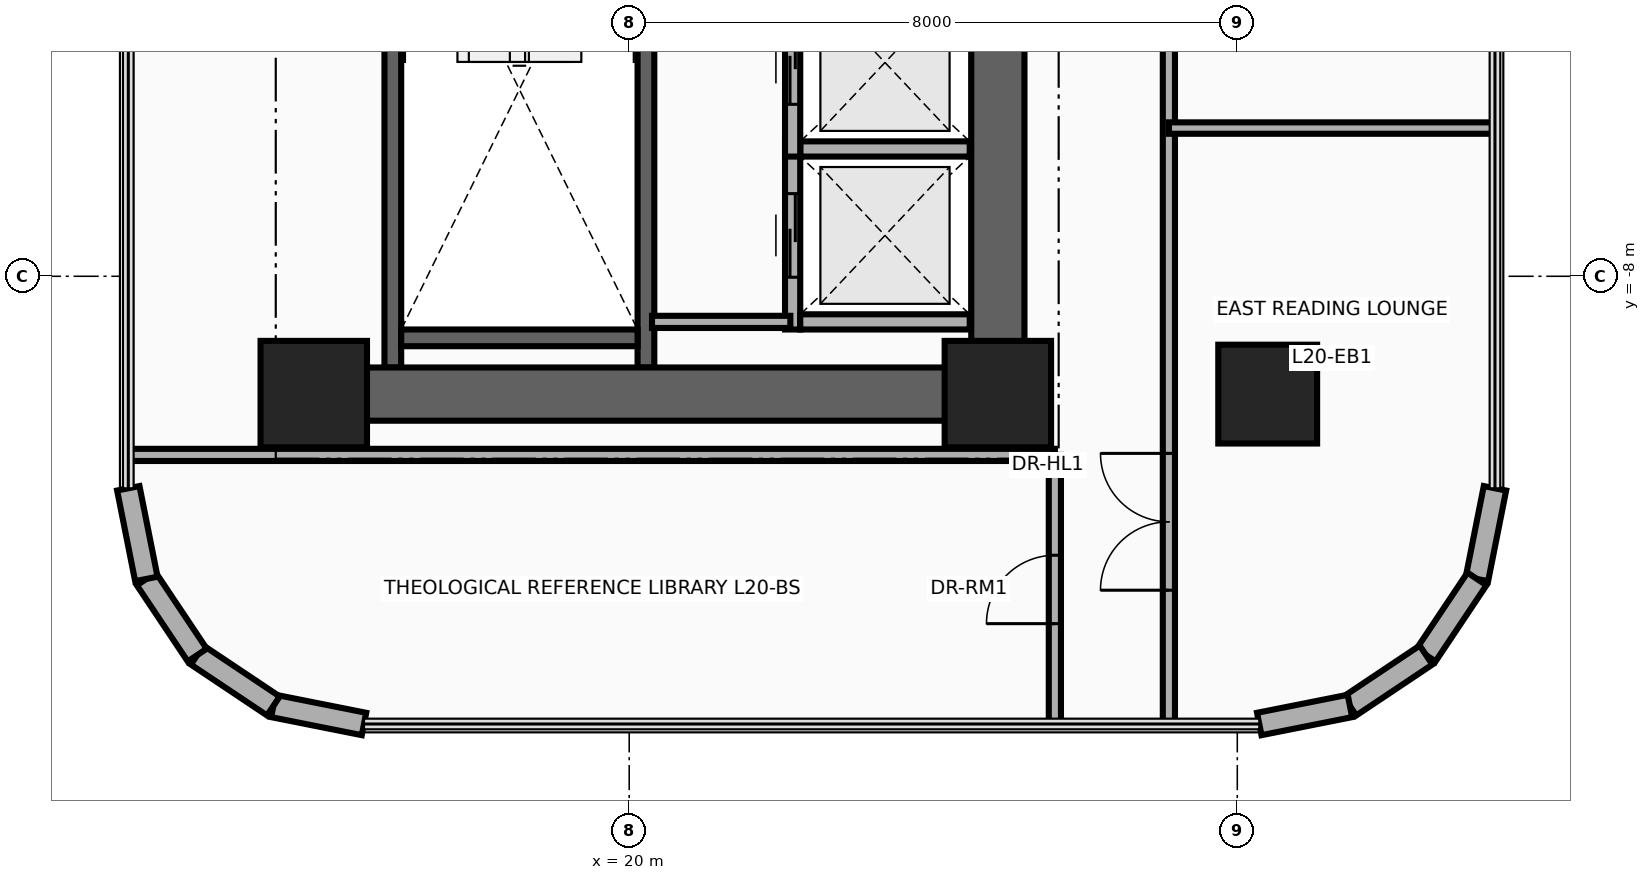
"""IFC4 building model, lengths in metres.
Left out: names, types, materials, properties, quantities, classifications, styles, units other than length and angle.
Written with IfcOpenShell. Run it as: python <this file> out.ifc"""

import sys

from ifc_helpers import new_model, si_unit, direction, frame, frame_2d, origin, origin_2d, place, context, subcontext, project, spatial, rectangle, circle, extrude, source, transform, mapped, element, fill, save


model = new_model("IFC4")
c1 = context("Model", 3, precision=1e-05, world=origin(), true_north=direction((0.0, 1.0)))
c2 = subcontext(c1, "Body", "Model", "MODEL_VIEW")
j1 = project(units=[si_unit("LENGTHUNIT", "METRE"), si_unit("PLANEANGLEUNIT", "RADIAN")], contexts=[c1])
p1 = place(None, origin())
s1 = spatial("IfcSite", under=j1, at=p1, CompositionType="ELEMENT")
p2 = place(p1, origin())
s2 = spatial("IfcBuilding", under=s1, at=p2, CompositionType="ELEMENT")
p3 = place(p2, frame((0.0, 0.0, 81.5)))
s3 = spatial("IfcBuildingStorey", under=s2, at=p3, CompositionType="ELEMENT", Elevation=81.5)
for number, where, z_axis, x_axis in (
    (1, (16.89, -9.2, 0.0), (0.0, 0.0, 1.0), (0.0, 1.0, 0.0)),
    (2, (20.22, -9.2, 0.0), (0.0, 0.0, 1.0), (0.0, 1.0, 0.0)),
):
    element("IfcWall", number, at=place(p3, frame(where, z_axis=z_axis, x_axis=x_axis)), inside=s3, PredefinedType="SHEAR", context=c2, shape_type="SweptSolid", body=[
        extrude(rectangle(XDim=8.52, YDim=0.22, at=frame_2d((4.26, 0.0))), origin(), (0.0, 0.0, 1.0), 3.46),
    ])
p4 = place(p3, frame((17.0, -8.81, 0.0), z_axis=(0.0, 0.0, 1.0), x_axis=(1.0, 0.0, 0.0)))
e3 = element("IfcWall", 3, at=p4, inside=s3, PredefinedType="SHEAR", context=c2, shape_type="SweptSolid", body=[
    extrude(rectangle(XDim=3.11, YDim=0.22, at=frame_2d((1.555, 0.0))), origin(), (0.0, 0.0, 1.0), 3.46),
])
p5 = place(p3, frame((24.85, -9.9, 0.0), z_axis=(0.0, 0.0, 1.0), x_axis=(0.0, 1.0, 0.0)))
e4 = element("IfcWall", 4, at=p5, inside=s3, PredefinedType="SHEAR", context=c2, shape_type="SweptSolid", body=[
    extrude(rectangle(XDim=8.95, YDim=0.7, at=frame_2d((4.475, 0.0))), origin(), (0.0, 0.0, 1.0), 3.46),
])
p6 = place(p3, frame((15.85, -9.55, 0.0), z_axis=(0.0, 0.0, 1.0), x_axis=(1.0, 0.0, 0.0)))
e5 = element("IfcWall", 5, at=p6, inside=s3, PredefinedType="SHEAR", context=c2, shape_type="SweptSolid", body=[
    extrude(rectangle(XDim=9.0, YDim=0.7, at=frame_2d((4.5, 0.0))), origin(), (0.0, 0.0, 1.0), 3.46),
])
m1 = source(origin(), c2, "Body", "SweptSolid", [
    extrude(rectangle(XDim=1.4, YDim=1.4, at=origin_2d()), origin(), (0.0, 0.0, 1.0), 3.7),
])
for number, where, z_axis, x_axis in (
    (6, (15.85, -9.55, 0.0), (0.0, 0.0, 1.0), (1.0, 0.0, 0.0)),
    (7, (24.85, -9.55, 0.0), (0.0, 0.0, 1.0), (1.0, 0.0, 0.0)),
):
    element("IfcColumn", number, at=place(p3, frame(where, z_axis=z_axis, x_axis=x_axis)), inside=s3, PredefinedType="COLUMN", context=c2, shape_type="MappedRepresentation", body=[
        mapped(m1, transform((0.0, 0.0, 0.0), x_axis=(1.0, 0.0, 0.0), y_axis=(0.0, 1.0, 0.0), z_axis=(0.0, 0.0, 1.0), scale=1.0)),
    ])
m2 = source(origin(), c2, "Body", "SweptSolid", [
    extrude(circle(Radius=0.65, at=origin_2d()), origin(), (0.0, 0.0, 1.0), 3.7),
])
p7 = place(p3, frame((28.4, -9.55, 0.0), z_axis=(0.0, 0.0, 1.0), x_axis=(1.0, 0.0, 0.0)))
e8 = element("IfcColumn", 8, at=p7, inside=s3, PredefinedType="COLUMN", context=c2, shape_type="MappedRepresentation", body=[
    mapped(m2, transform((0.0, 0.0, 0.0), x_axis=(1.0, 0.0, 0.0), y_axis=(0.0, 1.0, 0.0), z_axis=(0.0, 0.0, 1.0), scale=1.0)),
])
p8 = place(p3, frame((31.39, -10.789, 0.0), z_axis=(0.0, 0.0, 1.0), x_axis=(-0.194996050505, -0.980804027463, 0.0)))
e9 = element("IfcWall", 9, at=p8, inside=s3, PredefinedType="SOLIDWALL", context=c2, shape_type="SweptSolid", body=[
    extrude(rectangle(XDim=1.216, YDim=0.3, at=frame_2d((0.608, 0.0))), origin(), (0.0, 0.0, 1.0), 3.46),
])
for number, where, z_axis, x_axis in (
    (10, (31.153, -11.982, 0.0), (0.0, 0.0, 1.0), (-0.556, -0.831, 0.0)),
    (11, (30.483, -12.983, 0.0), (0.0, 0.0, 1.0), (-0.831, -0.556, 0.0)),
):
    element("IfcWall", number, at=place(p3, frame(where, z_axis=z_axis, x_axis=x_axis)), inside=s3, PredefinedType="SOLIDWALL", context=c2, shape_type="SweptSolid", body=[
        extrude(rectangle(XDim=1.205, YDim=0.3, at=frame_2d((0.603, 0.0))), origin(), (0.0, 0.0, 1.0), 3.46),
    ])
for number, where, z_axis, x_axis in (
    (12, (29.482, -13.653, 0.0), (0.0, 0.0, 1.0), (-0.981, -0.195, 0.0)),
    (13, (16.511, -13.89, 0.0), (0.0, 0.0, 1.0), (-0.981, 0.195, 0.0)),
):
    element("IfcWall", number, at=place(p3, frame(where, z_axis=z_axis, x_axis=x_axis)), inside=s3, PredefinedType="SOLIDWALL", context=c2, shape_type="SweptSolid", body=[
        extrude(rectangle(XDim=1.216, YDim=0.3, at=frame_2d((0.608, 0.0))), origin(), (0.0, 0.0, 1.0), 3.46),
    ])
for number, where, z_axis, x_axis in (
    (14, (15.318, -13.653, 0.0), (0.0, 0.0, 1.0), (-0.831, 0.556, 0.0)),
    (15, (14.317, -12.983, 0.0), (0.0, 0.0, 1.0), (-0.556, 0.831, 0.0)),
):
    element("IfcWall", number, at=place(p3, frame(where, z_axis=z_axis, x_axis=x_axis)), inside=s3, PredefinedType="SOLIDWALL", context=c2, shape_type="SweptSolid", body=[
        extrude(rectangle(XDim=1.205, YDim=0.3, at=frame_2d((0.603, 0.0))), origin(), (0.0, 0.0, 1.0), 3.46),
    ])
p9 = place(p3, frame((13.647, -11.982, 0.0), z_axis=(0.0, 0.0, 1.0), x_axis=(-0.195189223115, 0.980765602568, 0.0)))
e16 = element("IfcWall", 16, at=p9, inside=s3, PredefinedType="SOLIDWALL", context=c2, shape_type="SweptSolid", body=[
    extrude(rectangle(XDim=1.216, YDim=0.3, at=frame_2d((0.608, 0.0))), origin(), (0.0, 0.0, 1.0), 3.46),
])
p10 = place(p3, frame((22.15, -8.7, 0.0), z_axis=(0.0, 0.0, 1.0), x_axis=(0.0, 1.0, 0.0)))
e17 = element("IfcWall", 17, at=p10, inside=s3, PredefinedType="MOVABLE", context=c2, shape_type="SweptSolid", body=[
    extrude(rectangle(XDim=2.475, YDim=0.2, at=frame_2d((1.237, 0.0))), origin(), (0.0, 0.0, 1.0), 3.46),
])
p11 = place(p10, frame((0.688, 0.0, 0.0)))
e18 = element("IfcOpeningElement", 18, at=p11, cuts=e17, PredefinedType="OPENING", context=c2, shape_type="SweptSolid", body=[
    extrude(rectangle(XDim=1.1, YDim=2.1, at=frame_2d((0.55, 1.05))), frame((0.0, 0.115, 0.0), z_axis=(0.0, -1.0, 0.0), x_axis=(1.0, 0.0, 0.0)), (0.0, 0.0, 1.0), 0.23),
])
for number, where, z_axis, x_axis in (
    (19, (22.25, -8.6, 0.0), (0.0, 0.0, 1.0), (1.0, 0.0, 0.0)),
    (20, (22.25, -6.325, 0.0), (0.0, 0.0, 1.0), (1.0, 0.0, 0.0)),
):
    element("IfcWall", number, at=place(p3, frame(where, z_axis=z_axis, x_axis=x_axis)), inside=s3, PredefinedType="MOVABLE", context=c2, shape_type="SweptSolid", body=[
        extrude(rectangle(XDim=2.23, YDim=0.2, at=frame_2d((1.115, 0.0))), origin(), (0.0, 0.0, 1.0), 3.46),
    ])
p12 = place(p3, frame((22.15, -6.425, 0.0), z_axis=(0.0, 0.0, 1.0), x_axis=(0.0, 1.0, 0.0)))
e21 = element("IfcWall", 21, at=p12, inside=s3, PredefinedType="MOVABLE", context=c2, shape_type="SweptSolid", body=[
    extrude(rectangle(XDim=2.475, YDim=0.2, at=frame_2d((1.238, 0.0))), origin(), (0.0, 0.0, 1.0), 3.46),
])
p13 = place(p12, frame((0.688, 0.0, 0.0)))
e22 = element("IfcOpeningElement", 22, at=p13, cuts=e21, PredefinedType="OPENING", context=c2, shape_type="SweptSolid", body=[
    extrude(rectangle(XDim=1.1, YDim=2.1, at=frame_2d((0.55, 1.05))), frame((0.0, 0.115, 0.0), z_axis=(0.0, -1.0, 0.0), x_axis=(1.0, 0.0, 0.0)), (0.0, 0.0, 1.0), 0.23),
])
p14 = place(p3, frame((20.3, -8.6, 0.0), z_axis=(0.0, 0.0, 1.0), x_axis=(1.0, 0.0, 0.0)))
e23 = element("IfcWall", 23, at=p14, inside=s3, PredefinedType="PARTITIONING", context=c2, shape_type="SweptSolid", body=[
    extrude(rectangle(XDim=1.82, YDim=0.16, at=frame_2d((0.91, 0.0))), origin(), (0.0, 0.0, 1.0), 3.46),
])
p15 = place(p3, frame((25.6, -13.89, 0.0), z_axis=(0.0, 0.0, 1.0), x_axis=(0.0, 1.0, 0.0)))
e24 = element("IfcWall", 24, at=p15, inside=s3, PredefinedType="PARTITIONING", context=c2, shape_type="SweptSolid", body=[
    extrude(rectangle(XDim=3.54, YDim=0.16, at=frame_2d((1.77, 0.0))), origin(), (0.0, 0.0, 1.0), 3.46),
])
p16 = place(p15, frame((1.32, 0.0, 0.0)))
e25 = element("IfcOpeningElement", 25, at=p16, cuts=e24, PredefinedType="OPENING", context=c2, shape_type="SweptSolid", body=[
    extrude(rectangle(XDim=0.9, YDim=2.1, at=frame_2d((0.45, 1.05))), frame((0.0, 0.095, 0.0), z_axis=(0.0, -1.0, 0.0), x_axis=(1.0, 0.0, 0.0)), (0.0, 0.0, 1.0), 0.19),
])
p17 = place(p3, frame((13.41, -10.35, 0.0), z_axis=(0.0, 0.0, 1.0), x_axis=(1.0, 0.0, 0.0)))
e26 = element("IfcWall", 26, at=p17, inside=s3, PredefinedType="PARTITIONING", context=c2, shape_type="SweptSolid", body=[
    extrude(rectangle(XDim=12.19, YDim=0.16, at=frame_2d((6.095, 0.0))), origin(), (0.0, 0.0, 1.0), 3.46),
])
p18 = place(p3, frame((27.1, -13.89, 0.0), z_axis=(0.0, 0.0, 1.0), x_axis=(0.0, 1.0, 0.0)))
e27 = element("IfcWall", 27, at=p18, inside=s3, PredefinedType="PARTITIONING", context=c2, shape_type="SweptSolid", body=[
    extrude(rectangle(XDim=25.74, YDim=0.16, at=frame_2d((12.87, 0.0))), origin(), (0.0, 0.0, 1.0), 2.583),
])
p19 = place(p18, frame((1.76, 0.0, 0.0)))
e28 = element("IfcOpeningElement", 28, at=p19, cuts=e27, PredefinedType="OPENING", context=c2, shape_type="SweptSolid", body=[
    extrude(rectangle(XDim=1.8, YDim=2.15, at=frame_2d((0.9, 1.075))), frame((0.0, 0.095, 0.0), z_axis=(0.0, -1.0, 0.0), x_axis=(1.0, 0.0, 0.0)), (0.0, 0.0, 1.0), 0.19),
])
p20 = place(p18, frame((12.16, 0.0, 0.0)))
e29 = element("IfcOpeningElement", 29, at=p20, cuts=e27, PredefinedType="OPENING", context=c2, shape_type="SweptSolid", body=[
    extrude(rectangle(XDim=1.8, YDim=2.15, at=frame_2d((0.9, 1.075))), frame((0.0, 0.095, 0.0), z_axis=(0.0, -1.0, 0.0), x_axis=(1.0, 0.0, 0.0)), (0.0, 0.0, 1.0), 0.19),
])
p21 = place(p18, frame((20.365, 0.0, 0.0)))
e30 = element("IfcOpeningElement", 30, at=p21, cuts=e27, PredefinedType="OPENING", context=c2, shape_type="SweptSolid", body=[
    extrude(rectangle(XDim=1.8, YDim=2.15, at=frame_2d((0.9, 1.075))), frame((0.0, 0.095, 0.0), z_axis=(0.0, -1.0, 0.0), x_axis=(1.0, 0.0, 0.0)), (0.0, 0.0, 1.0), 0.19),
])
p22 = place(p3, frame((27.1, -6.05, 0.0), z_axis=(0.0, 0.0, 1.0), x_axis=(1.0, 0.0, 0.0)))
e31 = element("IfcWall", 31, at=p22, inside=s3, PredefinedType="PARTITIONING", context=c2, shape_type="SweptSolid", body=[
    extrude(rectangle(XDim=4.29, YDim=0.15, at=frame_2d((2.145, 0.0))), origin(), (0.0, 0.0, 1.0), 2.896),
])
p23 = place(p11, origin())
e32 = element("IfcDoor", 32, at=p23, inside=s3, OperationType="DOUBLE_DOOR_SLIDING", PredefinedType="DOOR", context=c2, shape_type="SweptSolid", body=[
    extrude(rectangle(XDim=1.1, YDim=2.1, at=frame_2d((0.55, 1.05))), frame((0.0, 0.025, 0.0), z_axis=(0.0, -1.0, 0.0), x_axis=(1.0, 0.0, 0.0)), (0.0, 0.0, 1.0), 0.05),
])
fill(e18, e32)
p24 = place(p13, origin())
e33 = element("IfcDoor", 33, at=p24, inside=s3, OperationType="DOUBLE_DOOR_SLIDING", PredefinedType="DOOR", context=c2, shape_type="SweptSolid", body=[
    extrude(rectangle(XDim=1.1, YDim=2.1, at=frame_2d((0.55, 1.05))), frame((0.0, 0.025, 0.0), z_axis=(0.0, -1.0, 0.0), x_axis=(1.0, 0.0, 0.0)), (0.0, 0.0, 1.0), 0.05),
])
fill(e22, e33)
p25 = place(p16, origin())
e34 = element("IfcDoor", 34, at=p25, inside=s3, OperationType="SINGLE_SWING_RIGHT", PredefinedType="DOOR", context=c2, shape_type="SweptSolid", body=[
    extrude(rectangle(XDim=0.9, YDim=2.1, at=frame_2d((0.45, 1.05))), frame((0.0, 0.025, 0.0), z_axis=(0.0, -1.0, 0.0), x_axis=(1.0, 0.0, 0.0)), (0.0, 0.0, 1.0), 0.05),
])
fill(e25, e34)
p26 = place(p19, origin())
e35 = element("IfcDoor", 35, at=p26, inside=s3, OperationType="DOUBLE_DOOR_SINGLE_SWING", PredefinedType="DOOR", context=c2, shape_type="SweptSolid", body=[
    extrude(rectangle(XDim=1.8, YDim=2.15, at=frame_2d((0.9, 1.075))), frame((0.0, 0.025, 0.0), z_axis=(0.0, -1.0, 0.0), x_axis=(1.0, 0.0, 0.0)), (0.0, 0.0, 1.0), 0.05),
])
fill(e28, e35)
save(model, sys.argv[1])
